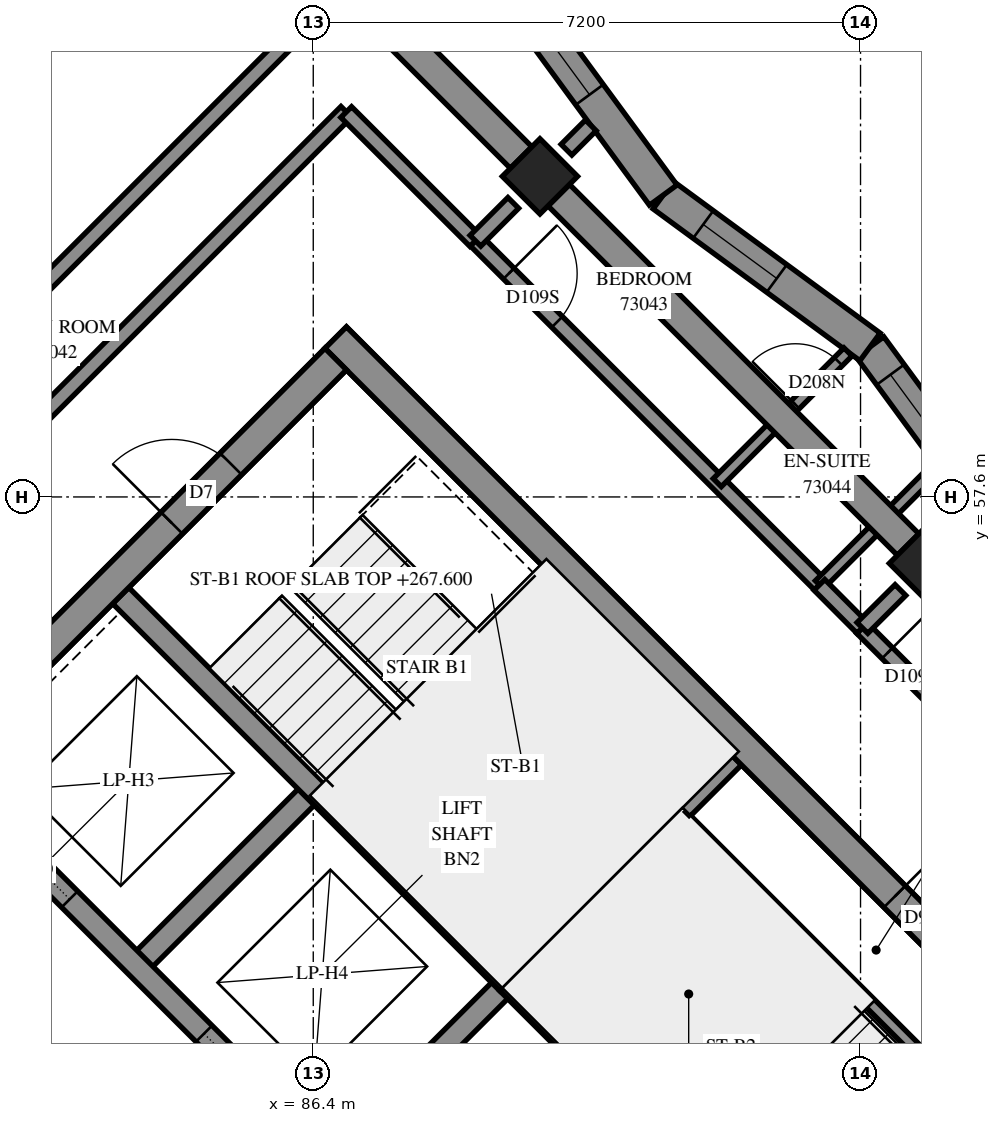
"""IFC4 building model, lengths in metres.
Left out: names, types, materials, properties, quantities, classifications, styles, units other than length and angle.
Written with IfcOpenShell. Run it as: python <this file> out.ifc"""

import sys

from ifc_helpers import new_model, si_unit, direction, frame, frame_2d, origin, origin_2d, place, context, subcontext, project, spatial, polyline, rectangle, outline, extrude, element, fill, save


model = new_model("IFC4")
c1 = context("Model", 3, precision=1e-05, world=origin(), true_north=direction((0.0, 1.0)))
c2 = subcontext(c1, "Body", "Model", "MODEL_VIEW")
j1 = project(units=[si_unit("LENGTHUNIT", "METRE"), si_unit("PLANEANGLEUNIT", "RADIAN")], contexts=[c1])
p1 = place(None, origin())
s1 = spatial("IfcSite", under=j1, at=p1, CompositionType="ELEMENT")
p2 = place(p1, origin())
s2 = spatial("IfcBuilding", under=s1, at=p2, CompositionType="ELEMENT")
p3 = place(p2, frame((0.0, 0.0, 267.6)))
s3 = spatial("IfcBuildingStorey", under=s2, at=p3, CompositionType="ELEMENT", Elevation=267.6)
for number, where, z_axis, x_axis in (
    (1, (89.382, 61.818, 0.0), (0.0, 0.0, 1.0), (0.707, -0.707, 0.0)),
    (2, (94.474, 56.727, 0.0), (0.0, 0.0, 1.0), (0.707, -0.707, 0.0)),
):
    element("IfcColumn", number, at=place(p3, frame(where, z_axis=z_axis, x_axis=x_axis)), inside=s3, PredefinedType="COLUMN", context=c2, shape_type="SweptSolid", body=[
        extrude(rectangle(XDim=0.7, YDim=0.7, at=origin_2d()), origin(), (0.0, 0.0, 1.0), 3.1),
    ])
p4 = place(p3, frame((86.695, 59.696, -0.3), z_axis=(0.0, 0.0, 1.0), x_axis=(0.7071100706, -0.7071034917, 0.0)))
e3 = element("IfcWall", 3, at=p4, inside=s3, PredefinedType="SHEAR", context=c2, shape_type="SweptSolid", body=[
    extrude(rectangle(XDim=15.2, YDim=0.4, at=frame_2d((7.6, 0.0))), origin(), (0.0, 0.0, 1.0), 2.7),
])
p5 = place(p4, frame((10.4, 0.0, 0.3)))
e4 = element("IfcOpeningElement", 4, at=p5, cuts=e3, PredefinedType="OPENING", context=c2, shape_type="SweptSolid", body=[
    extrude(rectangle(XDim=0.8, YDim=2.1, at=frame_2d((0.4, 1.05))), frame((0.0, 0.21, 0.0), z_axis=(0.0, -1.0, 0.0), x_axis=(1.0, 0.0, 0.0)), (0.0, 0.0, 1.0), 0.42),
])
p6 = place(p3, frame((76.513, 49.231, -0.3), z_axis=(0.0, 0.0, 1.0), x_axis=(0.7071067812, 0.7071067812, 0.0)))
e5 = element("IfcWall", 5, at=p6, inside=s3, PredefinedType="SHEAR", context=c2, shape_type="SweptSolid", body=[
    extrude(rectangle(XDim=14.4, YDim=0.4, at=frame_2d((7.2, 0.0))), origin(), (0.0, 0.0, 1.0), 2.7),
])
p7 = place(p6, frame((5.65, 0.0, 0.3)))
e6 = element("IfcOpeningElement", 6, at=p7, cuts=e5, PredefinedType="OPENING", context=c2, shape_type="SweptSolid", body=[
    extrude(rectangle(XDim=1.1, YDim=2.1, at=frame_2d((0.55, 1.05))), frame((0.0, 0.21, 0.0), z_axis=(0.0, -1.0, 0.0), x_axis=(1.0, 0.0, 0.0)), (0.0, 0.0, 1.0), 0.42),
])
p8 = place(p6, frame((11.35, 0.0, 0.3)))
e7 = element("IfcOpeningElement", 7, at=p8, cuts=e5, PredefinedType="OPENING", context=c2, shape_type="SweptSolid", body=[
    extrude(rectangle(XDim=1.1, YDim=2.1, at=frame_2d((0.55, 1.05))), frame((0.0, 0.21, 0.0), z_axis=(0.0, -1.0, 0.0), x_axis=(1.0, 0.0, 0.0)), (0.0, 0.0, 1.0), 0.42),
])
p9 = place(p6, frame((0.25, 0.0, 0.0)))
e8 = element("IfcOpeningElement", 8, at=p9, cuts=e5, PredefinedType="OPENING", context=c2, shape_type="SweptSolid", body=[
    extrude(rectangle(XDim=0.9, YDim=2.1, at=frame_2d((0.45, 1.05))), frame((0.0, 0.21, 0.0), z_axis=(0.0, -1.0, 0.0), x_axis=(1.0, 0.0, 0.0)), (0.0, 0.0, 1.0), 0.42),
])
p10 = place(p3, frame((84.079, 51.423, 0.0), z_axis=(0.0, 0.0, 1.0), x_axis=(0.7071219326, 0.7070916295, 0.0)))
e9 = element("IfcWall", 9, at=p10, inside=s3, PredefinedType="SOLIDWALL", context=c2, shape_type="SweptSolid", body=[
    extrude(rectangle(XDim=3.3, YDim=0.3, at=frame_2d((1.65, 0.0))), origin(), (0.0, 0.0, 1.0), 3.1),
])
p11 = place(p3, frame((86.625, 48.878, 0.0), z_axis=(0.0, 0.0, 1.0), x_axis=(0.7071067812, 0.7071067812, 0.0)))
e10 = element("IfcWall", 10, at=p11, inside=s3, PredefinedType="SOLIDWALL", context=c2, shape_type="SweptSolid", body=[
    extrude(rectangle(XDim=3.3, YDim=0.3, at=frame_2d((1.65, 0.0))), origin(), (0.0, 0.0, 1.0), 3.1),
])
p12 = place(p3, frame((78.988, 51.423, 0.0), z_axis=(0.0, 0.0, 1.0), x_axis=(0.7071067812, -0.7071067812, 0.0)))
e11 = element("IfcWall", 11, at=p12, inside=s3, PredefinedType="SOLIDWALL", context=c2, shape_type="SweptSolid", body=[
    extrude(rectangle(XDim=14.4, YDim=0.3, at=frame_2d((7.2, 0.0))), origin(), (0.0, 0.0, 1.0), 3.1),
])
p13 = place(p12, frame((4.95, 0.0, 0.0)))
e12 = element("IfcOpeningElement", 12, at=p13, cuts=e11, PredefinedType="OPENING", context=c2, shape_type="SweptSolid", body=[
    extrude(rectangle(XDim=0.9, YDim=2.1, at=frame_2d((0.45, 1.05))), frame((0.0, 0.16, 0.0), z_axis=(0.0, -1.0, 0.0), x_axis=(1.0, 0.0, 0.0)), (0.0, 0.0, 1.0), 0.32),
])
p14 = place(p12, frame((8.55, 0.0, 0.0)))
e13 = element("IfcOpeningElement", 13, at=p14, cuts=e11, PredefinedType="OPENING", context=c2, shape_type="SweptSolid", body=[
    extrude(rectangle(XDim=0.9, YDim=2.1, at=frame_2d((0.45, 1.05))), frame((0.0, 0.16, 0.0), z_axis=(0.0, -1.0, 0.0), x_axis=(1.0, 0.0, 0.0)), (0.0, 0.0, 1.0), 0.32),
])
p15 = place(p12, frame((12.05, 0.0, 0.0)))
e14 = element("IfcOpeningElement", 14, at=p15, cuts=e11, PredefinedType="OPENING", context=c2, shape_type="SweptSolid", body=[
    extrude(rectangle(XDim=1.1, YDim=2.1, at=frame_2d((0.55, 1.05))), frame((0.0, 0.16, 0.0), z_axis=(0.0, -1.0, 0.0), x_axis=(1.0, 0.0, 0.0)), (0.0, 0.0, 1.0), 0.32),
])
p16 = place(p3, frame((81.534, 53.969, 0.0), z_axis=(0.0, 0.0, 1.0), x_axis=(0.707103309, -0.7071102534, 0.0)))
e15 = element("IfcWall", 15, at=p16, inside=s3, PredefinedType="SOLIDWALL", context=c2, shape_type="SweptSolid", body=[
    extrude(rectangle(XDim=14.4, YDim=0.3, at=frame_2d((7.2, 0.0))), origin(), (0.0, 0.0, 1.0), 3.1),
])
p17 = place(p16, frame((8.55, 0.0, 0.0)))
e16 = element("IfcOpeningElement", 16, at=p17, cuts=e15, PredefinedType="OPENING", context=c2, shape_type="SweptSolid", body=[
    extrude(rectangle(XDim=0.9, YDim=2.1, at=frame_2d((0.45, 1.05))), frame((0.0, 0.16, 0.0), z_axis=(0.0, -1.0, 0.0), x_axis=(1.0, 0.0, 0.0)), (0.0, 0.0, 1.0), 0.32),
])
p18 = place(p16, frame((1.25, 0.0, 0.0)))
e17 = element("IfcOpeningElement", 17, at=p18, cuts=e15, PredefinedType="OPENING", context=c2, shape_type="SweptSolid", body=[
    extrude(rectangle(XDim=1.1, YDim=2.1, at=frame_2d((0.55, 1.05))), frame((0.0, 0.16, 0.0), z_axis=(0.0, -1.0, 0.0), x_axis=(1.0, 0.0, 0.0)), (0.0, 0.0, 1.0), 0.32),
])
p19 = place(p16, frame((4.85, 0.0, 0.0)))
e18 = element("IfcOpeningElement", 18, at=p19, cuts=e15, PredefinedType="OPENING", context=c2, shape_type="SweptSolid", body=[
    extrude(rectangle(XDim=1.1, YDim=2.1, at=frame_2d((0.55, 1.05))), frame((0.0, 0.16, 0.0), z_axis=(0.0, -1.0, 0.0), x_axis=(1.0, 0.0, 0.0)), (0.0, 0.0, 1.0), 0.32),
])
p20 = place(p16, frame((12.05, 0.0, 0.0)))
e19 = element("IfcOpeningElement", 19, at=p20, cuts=e15, PredefinedType="OPENING", context=c2, shape_type="SweptSolid", body=[
    extrude(rectangle(XDim=1.1, YDim=2.1, at=frame_2d((0.55, 1.05))), frame((0.0, 0.16, 0.0), z_axis=(0.0, -1.0, 0.0), x_axis=(1.0, 0.0, 0.0)), (0.0, 0.0, 1.0), 0.32),
])
for number, where, z_axis, x_axis in (
    (20, (83.867, 56.302, 0.0), (0.0, 0.0, 1.0), (0.707, -0.707, 0.0)),
    (21, (88.958, 51.211, 0.0), (0.0, 0.0, 1.0), (0.707, -0.707, 0.0)),
):
    element("IfcWall", number, at=place(p3, frame(where, z_axis=z_axis, x_axis=x_axis)), inside=s3, PredefinedType="SOLIDWALL", context=c2, shape_type="SweptSolid", body=[
        extrude(rectangle(XDim=7.2, YDim=0.3, at=frame_2d((3.6, 0.0))), origin(), (0.0, 0.0, 1.0), 3.1),
    ])
p21 = place(p3, frame((88.958, 51.211, 0.0), z_axis=(0.0, 0.0, 1.0), x_axis=(0.7071067812, 0.7071067812, 0.0)))
e22 = element("IfcWall", 22, at=p21, inside=s3, PredefinedType="SOLIDWALL", context=c2, shape_type="SweptSolid", body=[
    extrude(rectangle(XDim=4.2, YDim=0.3, at=frame_2d((2.1, 0.0))), origin(), (0.0, 0.0, 1.0), 3.1),
])
p22 = place(p3, frame((95.722, 56.854, 0.0), z_axis=(0.0, 0.0, 1.0), x_axis=(-0.5916565162, 0.8061901555, 0.0)))
e23 = element("IfcWall", 23, at=p22, inside=s3, PredefinedType="SOLIDWALL", context=c2, shape_type="SweptSolid", body=[
    extrude(outline(polyline([(0.035, -0.225), (3.409, -0.225), (3.34, 0.225), (-0.035, 0.225), (0.035, -0.225)])), origin(), (0.0, 0.0, 1.0), 3.1),
])
p23 = place(p22, frame((1.721, 0.0, 0.45)))
e24 = element("IfcOpeningElement", 24, at=p23, cuts=e23, PredefinedType="OPENING", context=c2, shape_type="SweptSolid", body=[
    extrude(rectangle(XDim=1.2, YDim=2.55, at=frame_2d((0.6, 1.275))), frame((0.0, 0.235, 0.0), z_axis=(0.0, -1.0, 0.0), x_axis=(1.0, 0.0, 0.0)), (0.0, 0.0, 1.0), 0.47),
])
p24 = place(p3, frame((93.725, 59.574, 0.0), z_axis=(0.0, 0.0, 1.0), x_axis=(-0.806200528, 0.5916423825, 0.0)))
e25 = element("IfcWall", 25, at=p24, inside=s3, PredefinedType="SOLIDWALL", context=c2, shape_type="SweptSolid", body=[
    extrude(outline(polyline([(-0.035, -0.225), (3.34, -0.225), (3.409, 0.225), (0.035, 0.225), (-0.035, -0.225)])), origin(), (0.0, 0.0, 1.0), 3.1),
])
p25 = place(p24, frame((1.522, 0.0, 0.45)))
e26 = element("IfcOpeningElement", 26, at=p25, cuts=e25, PredefinedType="OPENING", context=c2, shape_type="SweptSolid", body=[
    extrude(rectangle(XDim=1.2, YDim=2.55, at=frame_2d((0.6, 1.275))), frame((0.0, 0.235, 0.0), z_axis=(0.0, -1.0, 0.0), x_axis=(1.0, 0.0, 0.0)), (0.0, 0.0, 1.0), 0.47),
])
p26 = place(p3, frame((91.004, 61.571, 0.0), z_axis=(0.0, 0.0, 1.0), x_axis=(-0.5916423825, 0.806200528, 0.0)))
e27 = element("IfcWall", 27, at=p26, inside=s3, PredefinedType="SOLIDWALL", context=c2, shape_type="SweptSolid", body=[
    extrude(outline(polyline([(0.035, -0.225), (3.409, -0.225), (3.34, 0.225), (-0.035, 0.225), (0.035, -0.225)])), origin(), (0.0, 0.0, 1.0), 3.1),
])
p27 = place(p26, frame((1.639, 0.0, 0.45)))
e28 = element("IfcOpeningElement", 28, at=p27, cuts=e27, PredefinedType="OPENING", context=c2, shape_type="SweptSolid", body=[
    extrude(rectangle(XDim=1.2, YDim=2.55, at=frame_2d((0.6, 1.275))), frame((0.0, 0.235, 0.0), z_axis=(0.0, -1.0, 0.0), x_axis=(1.0, 0.0, 0.0)), (0.0, 0.0, 1.0), 0.47),
])
p28 = place(p3, frame((91.313, 53.354, 0.0), z_axis=(0.0, 0.0, 1.0), x_axis=(0.7071067812, -0.7071067812, 0.0)))
e29 = element("IfcWall", 29, at=p28, inside=s3, PredefinedType="PARTITIONING", context=c2, shape_type="SweptSolid", body=[
    extrude(rectangle(XDim=5.95, YDim=0.15, at=frame_2d((2.975, 0.0))), origin(), (0.0, 0.0, 1.0), 3.1),
])
p29 = place(p3, frame((80.799, 58.327, 0.0), z_axis=(0.0, 0.0, 1.0), x_axis=(0.7071120163, 0.707101546, 0.0)))
e30 = element("IfcWall", 30, at=p29, inside=s3, PredefinedType="PARTITIONING", context=c2, shape_type="SweptSolid", body=[
    extrude(rectangle(XDim=9.551, YDim=0.2, at=frame_2d((4.775, 0.0))), origin(), (0.0, 0.0, 1.0), 3.1),
])
p30 = place(p3, frame((80.802, 56.633, 0.0), z_axis=(0.0, 0.0, 1.0), x_axis=(0.7071067812, 0.7071067812, 0.0)))
e31 = element("IfcWall", 31, at=p30, inside=s3, PredefinedType="PARTITIONING", context=c2, shape_type="SweptSolid", body=[
    extrude(rectangle(XDim=8.533, YDim=0.2, at=frame_2d((4.267, 0.0))), origin(), (0.0, 0.0, 1.0), 3.1),
])
p31 = place(p30, frame((0.817, 0.0, 0.0)))
e32 = element("IfcOpeningElement", 32, at=p31, cuts=e31, PredefinedType="OPENING", context=c2, shape_type="SweptSolid", body=[
    extrude(rectangle(XDim=1.0, YDim=2.1, at=frame_2d((0.5, 1.05))), frame((0.0, 0.11, 0.0), z_axis=(0.0, -1.0, 0.0), x_axis=(1.0, 0.0, 0.0)), (0.0, 0.0, 1.0), 0.22),
])
p32 = place(p3, frame((88.537, 60.973, 0.0), z_axis=(0.0, 0.0, 1.0), x_axis=(0.7071067812, -0.7071067812, 0.0)))
e33 = element("IfcWall", 33, at=p32, inside=s3, PredefinedType="PARTITIONING", context=c2, shape_type="SweptSolid", body=[
    extrude(rectangle(XDim=6.401, YDim=0.2, at=frame_2d((3.2, 0.0))), origin(), (0.0, 0.0, 1.0), 3.1),
])
p33 = place(p32, frame((0.615, 0.0, 0.0)))
e34 = element("IfcOpeningElement", 34, at=p33, cuts=e33, PredefinedType="OPENING", context=c2, shape_type="SweptSolid", body=[
    extrude(rectangle(XDim=0.9, YDim=2.1, at=frame_2d((0.45, 1.05))), frame((0.0, 0.11, 0.0), z_axis=(0.0, -1.0, 0.0), x_axis=(1.0, 0.0, 0.0)), (0.0, 0.0, 1.0), 0.22),
])
p34 = place(p3, frame((93.621, 55.875, 0.0), z_axis=(0.0, 0.0, 1.0), x_axis=(0.7071067812, -0.7071067812, 0.0)))
e35 = element("IfcWall", 35, at=p34, inside=s3, PredefinedType="PARTITIONING", context=c2, shape_type="SweptSolid", body=[
    extrude(rectangle(XDim=4.5, YDim=0.2, at=frame_2d((2.25, 0.0))), origin(), (0.0, 0.0, 1.0), 3.1),
])
p35 = place(p34, frame((0.467, 0.0, 0.0)))
e36 = element("IfcOpeningElement", 36, at=p35, cuts=e35, PredefinedType="OPENING", context=c2, shape_type="SweptSolid", body=[
    extrude(rectangle(XDim=0.9, YDim=2.1, at=frame_2d((0.45, 1.05))), frame((0.0, 0.11, 0.0), z_axis=(0.0, -1.0, 0.0), x_axis=(1.0, 0.0, 0.0)), (0.0, 0.0, 1.0), 0.22),
])
p36 = place(p3, frame((86.833, 62.663, 0.0), z_axis=(0.0, 0.0, 1.0), x_axis=(0.7075233388, -0.706689978, 0.0)))
e37 = element("IfcWall", 37, at=p36, inside=s3, PredefinedType="PARTITIONING", context=c2, shape_type="SweptSolid", body=[
    extrude(rectangle(XDim=2.4, YDim=0.2, at=frame_2d((1.2, 0.0))), origin(), (0.0, 0.0, 1.0), 3.1),
])
p37 = place(p3, frame((91.716, 57.788, 0.0), z_axis=(0.0, 0.0, 1.0), x_axis=(0.7071067812, 0.7071067812, 0.0)))
e38 = element("IfcWall", 38, at=p37, inside=s3, PredefinedType="PARTITIONING", context=c2, shape_type="SweptSolid", body=[
    extrude(rectangle(XDim=2.432, YDim=0.15, at=frame_2d((1.216, 0.0))), origin(), (0.0, 0.0, 1.0), 3.1),
])
p38 = place(p37, frame((1.452, 0.0, 0.0)))
e39 = element("IfcOpeningElement", 39, at=p38, cuts=e38, PredefinedType="OPENING", context=c2, shape_type="SweptSolid", body=[
    extrude(rectangle(XDim=0.8, YDim=2.1, at=frame_2d((0.4, 1.05))), frame((0.0, 0.085, 0.0), z_axis=(0.0, -1.0, 0.0), x_axis=(1.0, 0.0, 0.0)), (0.0, 0.0, 1.0), 0.17),
])
p39 = place(p3, frame((93.059, 56.445, 0.0), z_axis=(0.0, 0.0, 1.0), x_axis=(0.7071067812, 0.7071067812, 0.0)))
e40 = element("IfcWall", 40, at=p39, inside=s3, PredefinedType="PARTITIONING", context=c2, shape_type="SweptSolid", body=[
    extrude(rectangle(XDim=2.189, YDim=0.15, at=frame_2d((1.094, 0.0))), origin(), (0.0, 0.0, 1.0), 3.1),
])
p40 = place(p3, frame((93.059, 56.443, 0.0), z_axis=(0.0, 0.0, 1.0), x_axis=(0.7058541592, -0.7083571881, 0.0)))
e41 = element("IfcWall", 41, at=p40, inside=s3, PredefinedType="PARTITIONING", context=c2, shape_type="SweptSolid", body=[
    extrude(rectangle(XDim=0.799, YDim=0.2, at=frame_2d((0.4, 0.0))), origin(), (0.0, 0.0, 1.0), 3.1),
])
p41 = place(p3, frame((93.625, 55.877, 0.0), z_axis=(0.0, 0.0, 1.0), x_axis=(0.7085224061, 0.7056883165, 0.0)))
e42 = element("IfcWall", 42, at=p41, inside=s3, PredefinedType="PARTITIONING", context=c2, shape_type="SweptSolid", body=[
    extrude(rectangle(XDim=0.706, YDim=0.2, at=frame_2d((0.353, 0.0))), origin(), (0.0, 0.0, 1.0), 3.1),
])
p42 = place(p3, frame((88.534, 60.971, 0.0), z_axis=(0.0, 0.0, 1.0), x_axis=(0.7071067812, 0.7071067812, 0.0)))
e43 = element("IfcWall", 43, at=p42, inside=s3, PredefinedType="PARTITIONING", context=c2, shape_type="SweptSolid", body=[
    extrude(rectangle(XDim=0.704, YDim=0.2, at=frame_2d((0.352, 0.0))), origin(), (0.0, 0.0, 1.0), 3.1),
])
p43 = place(p3, frame((89.731, 62.169, 0.0), z_axis=(0.0, 0.0, 1.0), x_axis=(0.7072172062, 0.7069963389, 0.0)))
e44 = element("IfcWall", 44, at=p43, inside=s3, PredefinedType="PARTITIONING", context=c2, shape_type="SweptSolid", body=[
    extrude(rectangle(XDim=0.453, YDim=0.2, at=frame_2d((0.226, 0.0))), origin(), (0.0, 0.0, 1.0), 3.1),
])
p44 = place(p23, origin())
e45 = element("IfcWindow", 45, at=p44, inside=s3, PartitioningType="SINGLE_PANEL", PredefinedType="WINDOW", context=c2, shape_type="SweptSolid", body=[
    extrude(rectangle(XDim=1.2, YDim=2.55, at=frame_2d((0.6, 1.275))), frame((0.0, 0.205, 0.0), z_axis=(0.0, -1.0, 0.0), x_axis=(1.0, 0.0, 0.0)), (0.0, 0.0, 1.0), 0.06),
])
fill(e24, e45)
p45 = place(p25, origin())
e46 = element("IfcWindow", 46, at=p45, inside=s3, PartitioningType="SINGLE_PANEL", PredefinedType="WINDOW", context=c2, shape_type="SweptSolid", body=[
    extrude(rectangle(XDim=1.2, YDim=2.55, at=frame_2d((0.6, 1.275))), frame((0.0, 0.205, 0.0), z_axis=(0.0, -1.0, 0.0), x_axis=(1.0, 0.0, 0.0)), (0.0, 0.0, 1.0), 0.06),
])
fill(e26, e46)
p46 = place(p27, origin())
e47 = element("IfcWindow", 47, at=p46, inside=s3, PartitioningType="SINGLE_PANEL", PredefinedType="WINDOW", context=c2, shape_type="SweptSolid", body=[
    extrude(rectangle(XDim=1.2, YDim=2.55, at=frame_2d((0.6, 1.275))), frame((0.0, 0.205, 0.0), z_axis=(0.0, -1.0, 0.0), x_axis=(1.0, 0.0, 0.0)), (0.0, 0.0, 1.0), 0.06),
])
fill(e28, e47)
p47 = place(p5, origin())
e48 = element("IfcDoor", 48, at=p47, inside=s3, OperationType="SINGLE_SWING_RIGHT", PredefinedType="DOOR", context=c2, shape_type="SweptSolid", body=[
    extrude(rectangle(XDim=0.8, YDim=2.1, at=frame_2d((0.4, 1.05))), frame((0.0, 0.025, 0.0), z_axis=(0.0, -1.0, 0.0), x_axis=(1.0, 0.0, 0.0)), (0.0, 0.0, 1.0), 0.05),
])
fill(e4, e48)
p48 = place(p8, origin())
e49 = element("IfcDoor", 49, at=p48, inside=s3, OperationType="SINGLE_SWING_LEFT", PredefinedType="DOOR", context=c2, shape_type="SweptSolid", body=[
    extrude(rectangle(XDim=1.1, YDim=2.1, at=frame_2d((0.55, 1.05))), frame((0.0, 0.025, 0.0), z_axis=(0.0, -1.0, 0.0), x_axis=(1.0, 0.0, 0.0)), (0.0, 0.0, 1.0), 0.05),
])
fill(e7, e49)
p49 = place(p18, origin())
e50 = element("IfcDoor", 50, at=p49, inside=s3, OperationType="SLIDING_TO_LEFT", PredefinedType="DOOR", context=c2, shape_type="SweptSolid", body=[
    extrude(rectangle(XDim=1.1, YDim=2.1, at=frame_2d((0.55, 1.05))), frame((0.0, 0.025, 0.0), z_axis=(0.0, -1.0, 0.0), x_axis=(1.0, 0.0, 0.0)), (0.0, 0.0, 1.0), 0.05),
])
fill(e17, e50)
p50 = place(p19, origin())
e51 = element("IfcDoor", 51, at=p50, inside=s3, OperationType="SLIDING_TO_RIGHT", PredefinedType="DOOR", context=c2, shape_type="SweptSolid", body=[
    extrude(rectangle(XDim=1.1, YDim=2.1, at=frame_2d((0.55, 1.05))), frame((0.0, 0.025, 0.0), z_axis=(0.0, -1.0, 0.0), x_axis=(1.0, 0.0, 0.0)), (0.0, 0.0, 1.0), 0.05),
])
fill(e18, e51)
p51 = place(p33, origin())
e52 = element("IfcDoor", 52, at=p51, inside=s3, OperationType="SINGLE_SWING_LEFT", PredefinedType="DOOR", context=c2, shape_type="SweptSolid", body=[
    extrude(rectangle(XDim=0.9, YDim=2.1, at=frame_2d((0.45, 1.05))), frame((0.0, 0.025, 0.0), z_axis=(0.0, -1.0, 0.0), x_axis=(1.0, 0.0, 0.0)), (0.0, 0.0, 1.0), 0.05),
])
fill(e34, e52)
p52 = place(p38, origin())
e53 = element("IfcDoor", 53, at=p52, inside=s3, OperationType="SINGLE_SWING_RIGHT", PredefinedType="DOOR", context=c2, shape_type="SweptSolid", body=[
    extrude(rectangle(XDim=0.8, YDim=2.1, at=frame_2d((0.4, 1.05))), frame((0.0, 0.025, 0.0), z_axis=(0.0, -1.0, 0.0), x_axis=(1.0, 0.0, 0.0)), (0.0, 0.0, 1.0), 0.05),
])
fill(e39, e53)
p53 = place(p35, origin())
e54 = element("IfcDoor", 54, at=p53, inside=s3, OperationType="SINGLE_SWING_LEFT", PredefinedType="DOOR", context=c2, shape_type="SweptSolid", body=[
    extrude(rectangle(XDim=0.9, YDim=2.1, at=frame_2d((0.45, 1.05))), frame((0.0, 0.025, 0.0), z_axis=(0.0, -1.0, 0.0), x_axis=(1.0, 0.0, 0.0)), (0.0, 0.0, 1.0), 0.05),
])
fill(e36, e54)
save(model, sys.argv[1])
